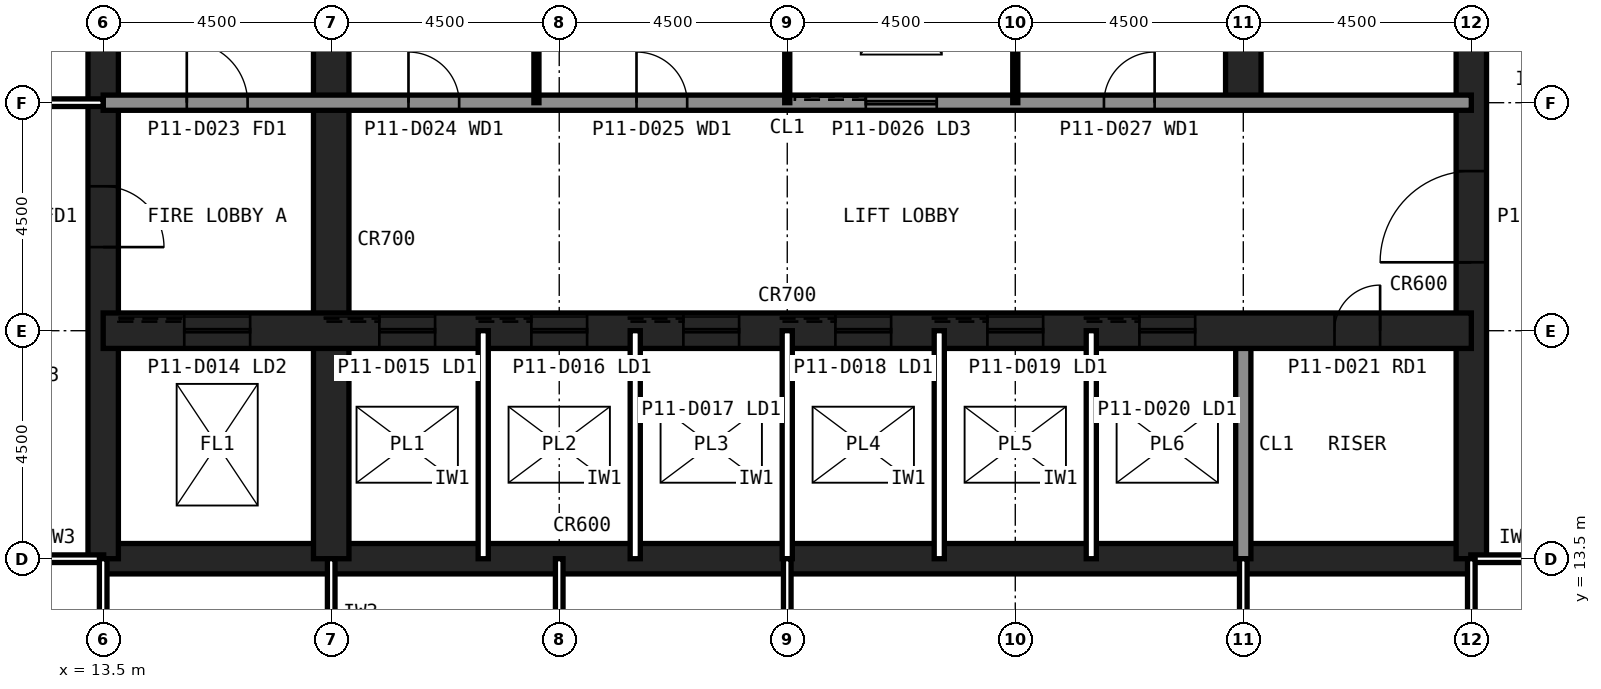
"""IFC4 building model, lengths in metres.
Left out: names, types, materials, properties, quantities, classifications, styles, units other than length and angle.
Written with IfcOpenShell. Run it as: python <this file> out.ifc"""

import sys

from ifc_helpers import new_model, si_unit, direction, frame, frame_2d, origin, place, context, subcontext, project, spatial, rectangle, extrude, element, fill, save


model = new_model("IFC4")
c1 = context("Model", 3, precision=1e-05, world=origin(), true_north=direction((0.0, 1.0)))
c2 = subcontext(c1, "Body", "Model", "MODEL_VIEW")
j1 = project(units=[si_unit("LENGTHUNIT", "METRE"), si_unit("PLANEANGLEUNIT", "RADIAN")], contexts=[c1])
p1 = place(None, origin())
s1 = spatial("IfcSite", under=j1, at=p1, CompositionType="ELEMENT")
p2 = place(p1, origin())
s2 = spatial("IfcBuilding", under=s1, at=p2, CompositionType="ELEMENT")
p3 = place(p2, frame((0.0, 0.0, 45.8)))
s3 = spatial("IfcBuildingStorey", under=s2, at=p3, CompositionType="ELEMENT", Elevation=45.8)
p4 = place(p3, frame((13.5, 13.5, 0.0), z_axis=(0.0, 0.0, 1.0), x_axis=(1.0, 0.0, 0.0)))
e1 = element("IfcWall", 1, at=p4, inside=s3, PredefinedType="SHEAR", context=c2, shape_type="SweptSolid", body=[
    extrude(rectangle(XDim=27.0, YDim=0.6, at=frame_2d((13.5, 0.0))), origin(), (0.0, 0.0, 1.0), 4.2),
])
p5 = place(p3, frame((40.5, 13.5, 0.0), z_axis=(0.0, 0.0, 1.0), x_axis=(0.0, 1.0, 0.0)))
e2 = element("IfcWall", 2, at=p5, inside=s3, PredefinedType="SHEAR", context=c2, shape_type="SweptSolid", body=[
    extrude(rectangle(XDim=27.0, YDim=0.6, at=frame_2d((13.5, 0.0))), origin(), (0.0, 0.0, 1.0), 4.2),
])
p6 = place(p5, frame((5.85, 0.0, 0.0)))
e3 = element("IfcOpeningElement", 3, at=p6, cuts=e2, PredefinedType="OPENING", context=c2, shape_type="SweptSolid", body=[
    extrude(rectangle(XDim=1.8, YDim=2.1, at=frame_2d((0.9, 1.05))), frame((0.0, 0.31, 0.0), z_axis=(0.0, -1.0, 0.0), x_axis=(1.0, 0.0, 0.0)), (0.0, 0.0, 1.0), 0.62),
])
p7 = place(p5, frame((19.65, 0.0, 0.0)))
e4 = element("IfcOpeningElement", 4, at=p7, cuts=e2, PredefinedType="OPENING", context=c2, shape_type="SweptSolid", body=[
    extrude(rectangle(XDim=1.2, YDim=2.1, at=frame_2d((0.6, 1.05))), frame((0.0, 0.31, 0.0), z_axis=(0.0, -1.0, 0.0), x_axis=(1.0, 0.0, 0.0)), (0.0, 0.0, 1.0), 0.62),
])
p8 = place(p3, frame((13.5, 40.5, 0.0), z_axis=(0.0, 0.0, 1.0), x_axis=(0.0, -1.0, 0.0)))
e5 = element("IfcWall", 5, at=p8, inside=s3, PredefinedType="SHEAR", context=c2, shape_type="SweptSolid", body=[
    extrude(rectangle(XDim=27.0, YDim=0.6, at=frame_2d((13.5, 0.0))), origin(), (0.0, 0.0, 1.0), 4.2),
])
p9 = place(p8, frame((19.65, 0.0, 0.0)))
e6 = element("IfcOpeningElement", 6, at=p9, cuts=e5, PredefinedType="OPENING", context=c2, shape_type="SweptSolid", body=[
    extrude(rectangle(XDim=1.2, YDim=2.1, at=frame_2d((0.6, 1.05))), frame((0.0, 0.31, 0.0), z_axis=(0.0, -1.0, 0.0), x_axis=(1.0, 0.0, 0.0)), (0.0, 0.0, 1.0), 0.62),
])
p10 = place(p8, frame((5.85, 0.0, 0.0)))
e7 = element("IfcOpeningElement", 7, at=p10, cuts=e5, PredefinedType="OPENING", context=c2, shape_type="SweptSolid", body=[
    extrude(rectangle(XDim=1.8, YDim=2.1, at=frame_2d((0.9, 1.05))), frame((0.0, 0.31, 0.0), z_axis=(0.0, -1.0, 0.0), x_axis=(1.0, 0.0, 0.0)), (0.0, 0.0, 1.0), 0.62),
])
p11 = place(p3, frame((18.0, 13.5, 0.0), z_axis=(0.0, 0.0, 1.0), x_axis=(0.0, 1.0, 0.0)))
e8 = element("IfcWall", 8, at=p11, inside=s3, PredefinedType="SHEAR", context=c2, shape_type="SweptSolid", body=[
    extrude(rectangle(XDim=18.0, YDim=0.7, at=frame_2d((9.0, 0.0))), origin(), (0.0, 0.0, 1.0), 4.2),
])
p12 = place(p3, frame((36.0, 13.5, 0.0), z_axis=(0.0, 0.0, 1.0), x_axis=(0.0, 1.0, 0.0)))
e9 = element("IfcWall", 9, at=p12, inside=s3, PredefinedType="SOLIDWALL", context=c2, shape_type="SweptSolid", body=[
    extrude(rectangle(XDim=4.5, YDim=0.3, at=frame_2d((2.25, 0.0))), origin(), (0.0, 0.0, 1.0), 4.04),
])
p13 = place(p3, frame((36.0, 22.5, 0.0), z_axis=(0.0, 0.0, 1.0), x_axis=(0.0, 1.0, 0.0)))
e10 = element("IfcWall", 10, at=p13, inside=s3, PredefinedType="SHEAR", context=c2, shape_type="SweptSolid", body=[
    extrude(rectangle(XDim=18.0, YDim=0.7, at=frame_2d((9.0, 0.0))), origin(), (0.0, 0.0, 1.0), 4.2),
])
p14 = place(p3, frame((13.5, 18.0, 0.0), z_axis=(0.0, 0.0, 1.0), x_axis=(1.0, 0.0, 0.0)))
e11 = element("IfcWall", 11, at=p14, inside=s3, PredefinedType="SHEAR", context=c2, shape_type="SweptSolid", body=[
    extrude(rectangle(XDim=27.0, YDim=0.7, at=frame_2d((13.5, 0.0))), origin(), (0.0, 0.0, 1.0), 4.2),
])
p15 = place(p14, frame((24.3, 0.0, 0.0)))
e12 = element("IfcOpeningElement", 12, at=p15, cuts=e11, PredefinedType="OPENING", context=c2, shape_type="SweptSolid", body=[
    extrude(rectangle(XDim=0.9, YDim=2.1, at=frame_2d((0.45, 1.05))), frame((0.0, 0.36, 0.0), z_axis=(0.0, -1.0, 0.0), x_axis=(1.0, 0.0, 0.0)), (0.0, 0.0, 1.0), 0.72),
])
p16 = place(p14, frame((5.45, 0.0, 0.0)))
e13 = element("IfcOpeningElement", 13, at=p16, cuts=e11, PredefinedType="OPENING", context=c2, shape_type="SweptSolid", body=[
    extrude(rectangle(XDim=1.1, YDim=2.1, at=frame_2d((0.55, 1.05))), frame((0.0, 0.36, 0.0), z_axis=(0.0, -1.0, 0.0), x_axis=(1.0, 0.0, 0.0)), (0.0, 0.0, 1.0), 0.72),
])
p17 = place(p14, frame((8.45, 0.0, 0.0)))
e14 = element("IfcOpeningElement", 14, at=p17, cuts=e11, PredefinedType="OPENING", context=c2, shape_type="SweptSolid", body=[
    extrude(rectangle(XDim=1.1, YDim=2.1, at=frame_2d((0.55, 1.05))), frame((0.0, 0.36, 0.0), z_axis=(0.0, -1.0, 0.0), x_axis=(1.0, 0.0, 0.0)), (0.0, 0.0, 1.0), 0.72),
])
p18 = place(p14, frame((11.45, 0.0, 0.0)))
e15 = element("IfcOpeningElement", 15, at=p18, cuts=e11, PredefinedType="OPENING", context=c2, shape_type="SweptSolid", body=[
    extrude(rectangle(XDim=1.1, YDim=2.1, at=frame_2d((0.55, 1.05))), frame((0.0, 0.36, 0.0), z_axis=(0.0, -1.0, 0.0), x_axis=(1.0, 0.0, 0.0)), (0.0, 0.0, 1.0), 0.72),
])
p19 = place(p14, frame((14.45, 0.0, 0.0)))
e16 = element("IfcOpeningElement", 16, at=p19, cuts=e11, PredefinedType="OPENING", context=c2, shape_type="SweptSolid", body=[
    extrude(rectangle(XDim=1.1, YDim=2.1, at=frame_2d((0.55, 1.05))), frame((0.0, 0.36, 0.0), z_axis=(0.0, -1.0, 0.0), x_axis=(1.0, 0.0, 0.0)), (0.0, 0.0, 1.0), 0.72),
])
p20 = place(p14, frame((17.45, 0.0, 0.0)))
e17 = element("IfcOpeningElement", 17, at=p20, cuts=e11, PredefinedType="OPENING", context=c2, shape_type="SweptSolid", body=[
    extrude(rectangle(XDim=1.1, YDim=2.1, at=frame_2d((0.55, 1.05))), frame((0.0, 0.36, 0.0), z_axis=(0.0, -1.0, 0.0), x_axis=(1.0, 0.0, 0.0)), (0.0, 0.0, 1.0), 0.72),
])
p21 = place(p14, frame((20.45, 0.0, 0.0)))
e18 = element("IfcOpeningElement", 18, at=p21, cuts=e11, PredefinedType="OPENING", context=c2, shape_type="SweptSolid", body=[
    extrude(rectangle(XDim=1.1, YDim=2.1, at=frame_2d((0.55, 1.05))), frame((0.0, 0.36, 0.0), z_axis=(0.0, -1.0, 0.0), x_axis=(1.0, 0.0, 0.0)), (0.0, 0.0, 1.0), 0.72),
])
p22 = place(p14, frame((1.6, 0.0, 0.0)))
e19 = element("IfcOpeningElement", 19, at=p22, cuts=e11, PredefinedType="OPENING", context=c2, shape_type="SweptSolid", body=[
    extrude(rectangle(XDim=1.3, YDim=2.2, at=frame_2d((0.65, 1.1))), frame((0.0, 0.36, 0.0), z_axis=(0.0, -1.0, 0.0), x_axis=(1.0, 0.0, 0.0)), (0.0, 0.0, 1.0), 0.72),
])
p23 = place(p3, frame((13.5, 22.5, 0.0), z_axis=(0.0, 0.0, 1.0), x_axis=(1.0, 0.0, 0.0)))
e20 = element("IfcWall", 20, at=p23, inside=s3, PredefinedType="SOLIDWALL", context=c2, shape_type="SweptSolid", body=[
    extrude(rectangle(XDim=27.0, YDim=0.3, at=frame_2d((13.5, 0.0))), origin(), (0.0, 0.0, 1.0), 4.04),
])
p24 = place(p23, frame((1.65, 0.0, 0.0)))
e21 = element("IfcOpeningElement", 21, at=p24, cuts=e20, PredefinedType="OPENING", context=c2, shape_type="SweptSolid", body=[
    extrude(rectangle(XDim=1.2, YDim=2.1, at=frame_2d((0.6, 1.05))), frame((0.0, 0.16, 0.0), z_axis=(0.0, -1.0, 0.0), x_axis=(1.0, 0.0, 0.0)), (0.0, 0.0, 1.0), 0.32),
])
p25 = place(p23, frame((6.025, 0.0, 0.0)))
e22 = element("IfcOpeningElement", 22, at=p25, cuts=e20, PredefinedType="OPENING", context=c2, shape_type="SweptSolid", body=[
    extrude(rectangle(XDim=1.0, YDim=2.1, at=frame_2d((0.5, 1.05))), frame((0.0, 0.16, 0.0), z_axis=(0.0, -1.0, 0.0), x_axis=(1.0, 0.0, 0.0)), (0.0, 0.0, 1.0), 0.32),
])
p26 = place(p23, frame((10.525, 0.0, 0.0)))
e23 = element("IfcOpeningElement", 23, at=p26, cuts=e20, PredefinedType="OPENING", context=c2, shape_type="SweptSolid", body=[
    extrude(rectangle(XDim=1.0, YDim=2.1, at=frame_2d((0.5, 1.05))), frame((0.0, 0.16, 0.0), z_axis=(0.0, -1.0, 0.0), x_axis=(1.0, 0.0, 0.0)), (0.0, 0.0, 1.0), 0.32),
])
p27 = place(p23, frame((19.75, 0.0, 0.0)))
e24 = element("IfcOpeningElement", 24, at=p27, cuts=e20, PredefinedType="OPENING", context=c2, shape_type="SweptSolid", body=[
    extrude(rectangle(XDim=1.0, YDim=2.1, at=frame_2d((0.5, 1.05))), frame((0.0, 0.16, 0.0), z_axis=(0.0, -1.0, 0.0), x_axis=(1.0, 0.0, 0.0)), (0.0, 0.0, 1.0), 0.32),
])
p28 = place(p23, frame((15.05, 0.0, 0.0)))
e25 = element("IfcOpeningElement", 25, at=p28, cuts=e20, PredefinedType="OPENING", context=c2, shape_type="SweptSolid", body=[
    extrude(rectangle(XDim=1.4, YDim=2.4, at=frame_2d((0.7, 1.2))), frame((0.0, 0.16, 0.0), z_axis=(0.0, -1.0, 0.0), x_axis=(1.0, 0.0, 0.0)), (0.0, 0.0, 1.0), 0.32),
])
for number, where, z_axis, x_axis in (
    (26, (21.0, 13.5, 0.0), (0.0, 0.0, 1.0), (0.0, 1.0, 0.0)),
    (27, (24.0, 13.5, 0.0), (0.0, 0.0, 1.0), (0.0, 1.0, 0.0)),
    (28, (27.0, 13.5, 0.0), (0.0, 0.0, 1.0), (0.0, 1.0, 0.0)),
    (29, (30.0, 13.5, 0.0), (0.0, 0.0, 1.0), (0.0, 1.0, 0.0)),
    (30, (33.0, 13.5, 0.0), (0.0, 0.0, 1.0), (0.0, 1.0, 0.0)),
):
    element("IfcWall", number, at=place(p3, frame(where, z_axis=z_axis, x_axis=x_axis)), inside=s3, PredefinedType="PARTITIONING", context=c2, shape_type="SweptSolid", body=[
        extrude(rectangle(XDim=4.5, YDim=0.2, at=frame_2d((2.25, 0.0))), origin(), (0.0, 0.0, 1.0), 4.04),
    ])
for number, where, z_axis, x_axis in (
    (31, (22.05, 22.5, 0.0), (0.0, 0.0, 1.0), (0.0, 1.0, 0.0)),
    (32, (27.0, 22.5, 0.0), (0.0, 0.0, 1.0), (0.0, 1.0, 0.0)),
    (33, (31.5, 22.5, 0.0), (0.0, 0.0, 1.0), (0.0, 1.0, 0.0)),
):
    element("IfcWall", number, at=place(p3, frame(where, z_axis=z_axis, x_axis=x_axis)), inside=s3, PredefinedType="PLUMBINGWALL", context=c2, shape_type="SweptSolid", body=[
        extrude(rectangle(XDim=9.0, YDim=0.1, at=frame_2d((4.5, 0.0))), origin(), (0.0, 0.0, 1.0), 4.04),
    ])
for number, where, z_axis, x_axis in (
    (34, (11.7, 13.5, 0.0), (0.0, 0.0, 1.0), (1.0, 0.0, 0.0)),
    (35, (40.49, 13.5, 0.0), (0.0, 0.0, 1.0), (1.0, 0.0, 0.0)),
):
    element("IfcWall", number, at=place(p3, frame(where, z_axis=z_axis, x_axis=x_axis)), inside=s3, PredefinedType="PARTITIONING", context=c2, shape_type="SweptSolid", body=[
        extrude(rectangle(XDim=1.81, YDim=0.15, at=frame_2d((0.905, 0.0))), origin(), (0.0, 0.0, 1.0), 3.189),
    ])
p29 = place(p3, frame((22.5, 8.1, 0.0), z_axis=(0.0, 0.0, 1.0), x_axis=(0.0, 1.0, 0.0)))
e36 = element("IfcWall", 36, at=p29, inside=s3, PredefinedType="PARTITIONING", context=c2, shape_type="SweptSolid", body=[
    extrude(rectangle(XDim=5.4, YDim=0.15, at=frame_2d((2.7, 0.0))), origin(), (0.0, 0.0, 1.0), 3.189),
])
p30 = place(p3, frame((18.0, 13.5, 0.0), z_axis=(0.0, 0.0, 1.0), x_axis=(0.0, -1.0, 0.0)))
e37 = element("IfcWall", 37, at=p30, inside=s3, PredefinedType="PARTITIONING", context=c2, shape_type="SweptSolid", body=[
    extrude(rectangle(XDim=5.4, YDim=0.15, at=frame_2d((2.7, 0.0))), origin(), (0.0, 0.0, 1.0), 3.189),
])
p31 = place(p30, frame((2.2, 0.0, 0.0)))
e38 = element("IfcOpeningElement", 38, at=p31, cuts=e37, PredefinedType="OPENING", context=c2, shape_type="SweptSolid", body=[
    extrude(rectangle(XDim=1.0, YDim=2.1, at=frame_2d((0.5, 1.05))), frame((0.0, 0.085, 0.0), z_axis=(0.0, -1.0, 0.0), x_axis=(1.0, 0.0, 0.0)), (0.0, 0.0, 1.0), 0.17),
])
p32 = place(p3, frame((27.0, 8.1, 0.0), z_axis=(0.0, 0.0, 1.0), x_axis=(0.0, 1.0, 0.0)))
e39 = element("IfcWall", 39, at=p32, inside=s3, PredefinedType="PARTITIONING", context=c2, shape_type="SweptSolid", body=[
    extrude(rectangle(XDim=5.4, YDim=0.15, at=frame_2d((2.7, 0.0))), origin(), (0.0, 0.0, 1.0), 3.189),
])
p33 = place(p32, frame((2.2, 0.0, 0.0)))
e40 = element("IfcOpeningElement", 40, at=p33, cuts=e39, PredefinedType="OPENING", context=c2, shape_type="SweptSolid", body=[
    extrude(rectangle(XDim=1.0, YDim=2.1, at=frame_2d((0.5, 1.05))), frame((0.0, 0.085, 0.0), z_axis=(0.0, -1.0, 0.0), x_axis=(1.0, 0.0, 0.0)), (0.0, 0.0, 1.0), 0.17),
])
p34 = place(p3, frame((9.9, 22.5, 0.0), z_axis=(0.0, 0.0, 1.0), x_axis=(1.0, 0.0, 0.0)))
e41 = element("IfcWall", 41, at=p34, inside=s3, PredefinedType="PARTITIONING", context=c2, shape_type="SweptSolid", body=[
    extrude(rectangle(XDim=3.6, YDim=0.15, at=frame_2d((1.8, 0.0))), origin(), (0.0, 0.0, 1.0), 3.189),
])
p35 = place(p3, frame((40.5, 5.4, 0.0), z_axis=(0.0, 0.0, 1.0), x_axis=(0.0, 1.0, 0.0)))
e42 = element("IfcWall", 42, at=p35, inside=s3, PredefinedType="PARTITIONING", context=c2, shape_type="SweptSolid", body=[
    extrude(rectangle(XDim=8.1, YDim=0.15, at=frame_2d((4.05, 0.0))), origin(), (0.0, 0.0, 1.0), 3.189),
])
p36 = place(p35, frame((3.55, 0.0, 0.0)))
e43 = element("IfcOpeningElement", 43, at=p36, cuts=e42, PredefinedType="OPENING", context=c2, shape_type="SweptSolid", body=[
    extrude(rectangle(XDim=1.0, YDim=2.1, at=frame_2d((0.5, 1.05))), frame((0.0, 0.085, 0.0), z_axis=(0.0, -1.0, 0.0), x_axis=(1.0, 0.0, 0.0)), (0.0, 0.0, 1.0), 0.17),
])
p37 = place(p3, frame((13.5, 0.445, 0.0), z_axis=(0.0, 0.0, 1.0), x_axis=(0.0, 1.0, 0.0)))
e44 = element("IfcWall", 44, at=p37, inside=s3, PredefinedType="PARTITIONING", context=c2, shape_type="SweptSolid", body=[
    extrude(rectangle(XDim=13.055, YDim=0.15, at=frame_2d((6.527, 0.0))), origin(), (0.0, 0.0, 1.0), 3.189),
])
p38 = place(p37, frame((6.028, 0.0, 0.0)))
e45 = element("IfcOpeningElement", 45, at=p38, cuts=e44, PredefinedType="OPENING", context=c2, shape_type="SweptSolid", body=[
    extrude(rectangle(XDim=1.0, YDim=2.1, at=frame_2d((0.5, 1.05))), frame((0.0, 0.085, 0.0), z_axis=(0.0, -1.0, 0.0), x_axis=(1.0, 0.0, 0.0)), (0.0, 0.0, 1.0), 0.17),
])
p39 = place(p3, frame((36.0, 13.5, 0.0), z_axis=(0.0, 0.0, 1.0), x_axis=(0.0, -1.0, 0.0)))
e46 = element("IfcWall", 46, at=p39, inside=s3, PredefinedType="PARTITIONING", context=c2, shape_type="SweptSolid", body=[
    extrude(rectangle(XDim=8.1, YDim=0.15, at=frame_2d((4.05, 0.0))), origin(), (0.0, 0.0, 1.0), 3.189),
])
p40 = place(p39, frame((3.55, 0.0, 0.0)))
e47 = element("IfcOpeningElement", 47, at=p40, cuts=e46, PredefinedType="OPENING", context=c2, shape_type="SweptSolid", body=[
    extrude(rectangle(XDim=1.0, YDim=2.1, at=frame_2d((0.5, 1.05))), frame((0.0, 0.085, 0.0), z_axis=(0.0, -1.0, 0.0), x_axis=(1.0, 0.0, 0.0)), (0.0, 0.0, 1.0), 0.17),
])
p41 = place(p9, origin())
e48 = element("IfcDoor", 48, at=p41, inside=s3, OperationType="SINGLE_SWING_RIGHT", PredefinedType="DOOR", context=c2, shape_type="SweptSolid", body=[
    extrude(rectangle(XDim=1.2, YDim=2.1, at=frame_2d((0.6, 1.05))), frame((0.0, 0.025, 0.0), z_axis=(0.0, -1.0, 0.0), x_axis=(1.0, 0.0, 0.0)), (0.0, 0.0, 1.0), 0.05),
])
fill(e6, e48)
p42 = place(p6, origin())
e49 = element("IfcDoor", 49, at=p42, inside=s3, OperationType="SINGLE_SWING_LEFT", PredefinedType="DOOR", context=c2, shape_type="SweptSolid", body=[
    extrude(rectangle(XDim=1.8, YDim=2.1, at=frame_2d((0.9, 1.05))), frame((0.0, 0.025, 0.0), z_axis=(0.0, -1.0, 0.0), x_axis=(1.0, 0.0, 0.0)), (0.0, 0.0, 1.0), 0.05),
])
fill(e3, e49)
p43 = place(p24, origin())
e50 = element("IfcDoor", 50, at=p43, inside=s3, OperationType="SINGLE_SWING_LEFT", PredefinedType="DOOR", context=c2, shape_type="SweptSolid", body=[
    extrude(rectangle(XDim=1.2, YDim=2.1, at=frame_2d((0.6, 1.05))), frame((0.0, 0.025, 0.0), z_axis=(0.0, -1.0, 0.0), x_axis=(1.0, 0.0, 0.0)), (0.0, 0.0, 1.0), 0.05),
])
fill(e21, e50)
p44 = place(p25, origin())
e51 = element("IfcDoor", 51, at=p44, inside=s3, OperationType="SINGLE_SWING_LEFT", PredefinedType="DOOR", context=c2, shape_type="SweptSolid", body=[
    extrude(rectangle(XDim=1.0, YDim=2.1, at=frame_2d((0.5, 1.05))), frame((0.0, 0.025, 0.0), z_axis=(0.0, -1.0, 0.0), x_axis=(1.0, 0.0, 0.0)), (0.0, 0.0, 1.0), 0.05),
])
fill(e22, e51)
p45 = place(p26, origin())
e52 = element("IfcDoor", 52, at=p45, inside=s3, OperationType="SINGLE_SWING_LEFT", PredefinedType="DOOR", context=c2, shape_type="SweptSolid", body=[
    extrude(rectangle(XDim=1.0, YDim=2.1, at=frame_2d((0.5, 1.05))), frame((0.0, 0.025, 0.0), z_axis=(0.0, -1.0, 0.0), x_axis=(1.0, 0.0, 0.0)), (0.0, 0.0, 1.0), 0.05),
])
fill(e23, e52)
p46 = place(p27, origin())
e53 = element("IfcDoor", 53, at=p46, inside=s3, OperationType="SINGLE_SWING_RIGHT", PredefinedType="DOOR", context=c2, shape_type="SweptSolid", body=[
    extrude(rectangle(XDim=1.0, YDim=2.1, at=frame_2d((0.5, 1.05))), frame((0.0, 0.025, 0.0), z_axis=(0.0, -1.0, 0.0), x_axis=(1.0, 0.0, 0.0)), (0.0, 0.0, 1.0), 0.05),
])
fill(e24, e53)
p47 = place(p15, origin())
e54 = element("IfcDoor", 54, at=p47, inside=s3, OperationType="SINGLE_SWING_RIGHT", PredefinedType="DOOR", context=c2, shape_type="SweptSolid", body=[
    extrude(rectangle(XDim=0.9, YDim=2.1, at=frame_2d((0.45, 1.05))), frame((0.0, 0.025, 0.0), z_axis=(0.0, -1.0, 0.0), x_axis=(1.0, 0.0, 0.0)), (0.0, 0.0, 1.0), 0.05),
])
fill(e12, e54)
p48 = place(p16, origin())
e55 = element("IfcDoor", 55, at=p48, inside=s3, OperationType="SLIDING_TO_LEFT", PredefinedType="DOOR", context=c2, shape_type="SweptSolid", body=[
    extrude(rectangle(XDim=1.1, YDim=2.1, at=frame_2d((0.55, 1.05))), frame((0.0, 0.025, 0.0), z_axis=(0.0, -1.0, 0.0), x_axis=(1.0, 0.0, 0.0)), (0.0, 0.0, 1.0), 0.05),
])
fill(e13, e55)
p49 = place(p17, origin())
e56 = element("IfcDoor", 56, at=p49, inside=s3, OperationType="SLIDING_TO_LEFT", PredefinedType="DOOR", context=c2, shape_type="SweptSolid", body=[
    extrude(rectangle(XDim=1.1, YDim=2.1, at=frame_2d((0.55, 1.05))), frame((0.0, 0.025, 0.0), z_axis=(0.0, -1.0, 0.0), x_axis=(1.0, 0.0, 0.0)), (0.0, 0.0, 1.0), 0.05),
])
fill(e14, e56)
p50 = place(p18, origin())
e57 = element("IfcDoor", 57, at=p50, inside=s3, OperationType="SLIDING_TO_LEFT", PredefinedType="DOOR", context=c2, shape_type="SweptSolid", body=[
    extrude(rectangle(XDim=1.1, YDim=2.1, at=frame_2d((0.55, 1.05))), frame((0.0, 0.025, 0.0), z_axis=(0.0, -1.0, 0.0), x_axis=(1.0, 0.0, 0.0)), (0.0, 0.0, 1.0), 0.05),
])
fill(e15, e57)
p51 = place(p19, origin())
e58 = element("IfcDoor", 58, at=p51, inside=s3, OperationType="SLIDING_TO_LEFT", PredefinedType="DOOR", context=c2, shape_type="SweptSolid", body=[
    extrude(rectangle(XDim=1.1, YDim=2.1, at=frame_2d((0.55, 1.05))), frame((0.0, 0.025, 0.0), z_axis=(0.0, -1.0, 0.0), x_axis=(1.0, 0.0, 0.0)), (0.0, 0.0, 1.0), 0.05),
])
fill(e16, e58)
p52 = place(p20, origin())
e59 = element("IfcDoor", 59, at=p52, inside=s3, OperationType="SLIDING_TO_LEFT", PredefinedType="DOOR", context=c2, shape_type="SweptSolid", body=[
    extrude(rectangle(XDim=1.1, YDim=2.1, at=frame_2d((0.55, 1.05))), frame((0.0, 0.025, 0.0), z_axis=(0.0, -1.0, 0.0), x_axis=(1.0, 0.0, 0.0)), (0.0, 0.0, 1.0), 0.05),
])
fill(e17, e59)
p53 = place(p21, origin())
e60 = element("IfcDoor", 60, at=p53, inside=s3, OperationType="SLIDING_TO_LEFT", PredefinedType="DOOR", context=c2, shape_type="SweptSolid", body=[
    extrude(rectangle(XDim=1.1, YDim=2.1, at=frame_2d((0.55, 1.05))), frame((0.0, 0.025, 0.0), z_axis=(0.0, -1.0, 0.0), x_axis=(1.0, 0.0, 0.0)), (0.0, 0.0, 1.0), 0.05),
])
fill(e18, e60)
p54 = place(p22, origin())
e61 = element("IfcDoor", 61, at=p54, inside=s3, OperationType="SLIDING_TO_LEFT", PredefinedType="DOOR", context=c2, shape_type="SweptSolid", body=[
    extrude(rectangle(XDim=1.3, YDim=2.2, at=frame_2d((0.65, 1.1))), frame((0.0, 0.025, 0.0), z_axis=(0.0, -1.0, 0.0), x_axis=(1.0, 0.0, 0.0)), (0.0, 0.0, 1.0), 0.05),
])
fill(e19, e61)
p55 = place(p28, origin())
e62 = element("IfcDoor", 62, at=p55, inside=s3, OperationType="SLIDING_TO_LEFT", PredefinedType="DOOR", context=c2, shape_type="SweptSolid", body=[
    extrude(rectangle(XDim=1.4, YDim=2.4, at=frame_2d((0.7, 1.2))), frame((0.0, 0.025, 0.0), z_axis=(0.0, -1.0, 0.0), x_axis=(1.0, 0.0, 0.0)), (0.0, 0.0, 1.0), 0.05),
])
fill(e25, e62)
save(model, sys.argv[1])
